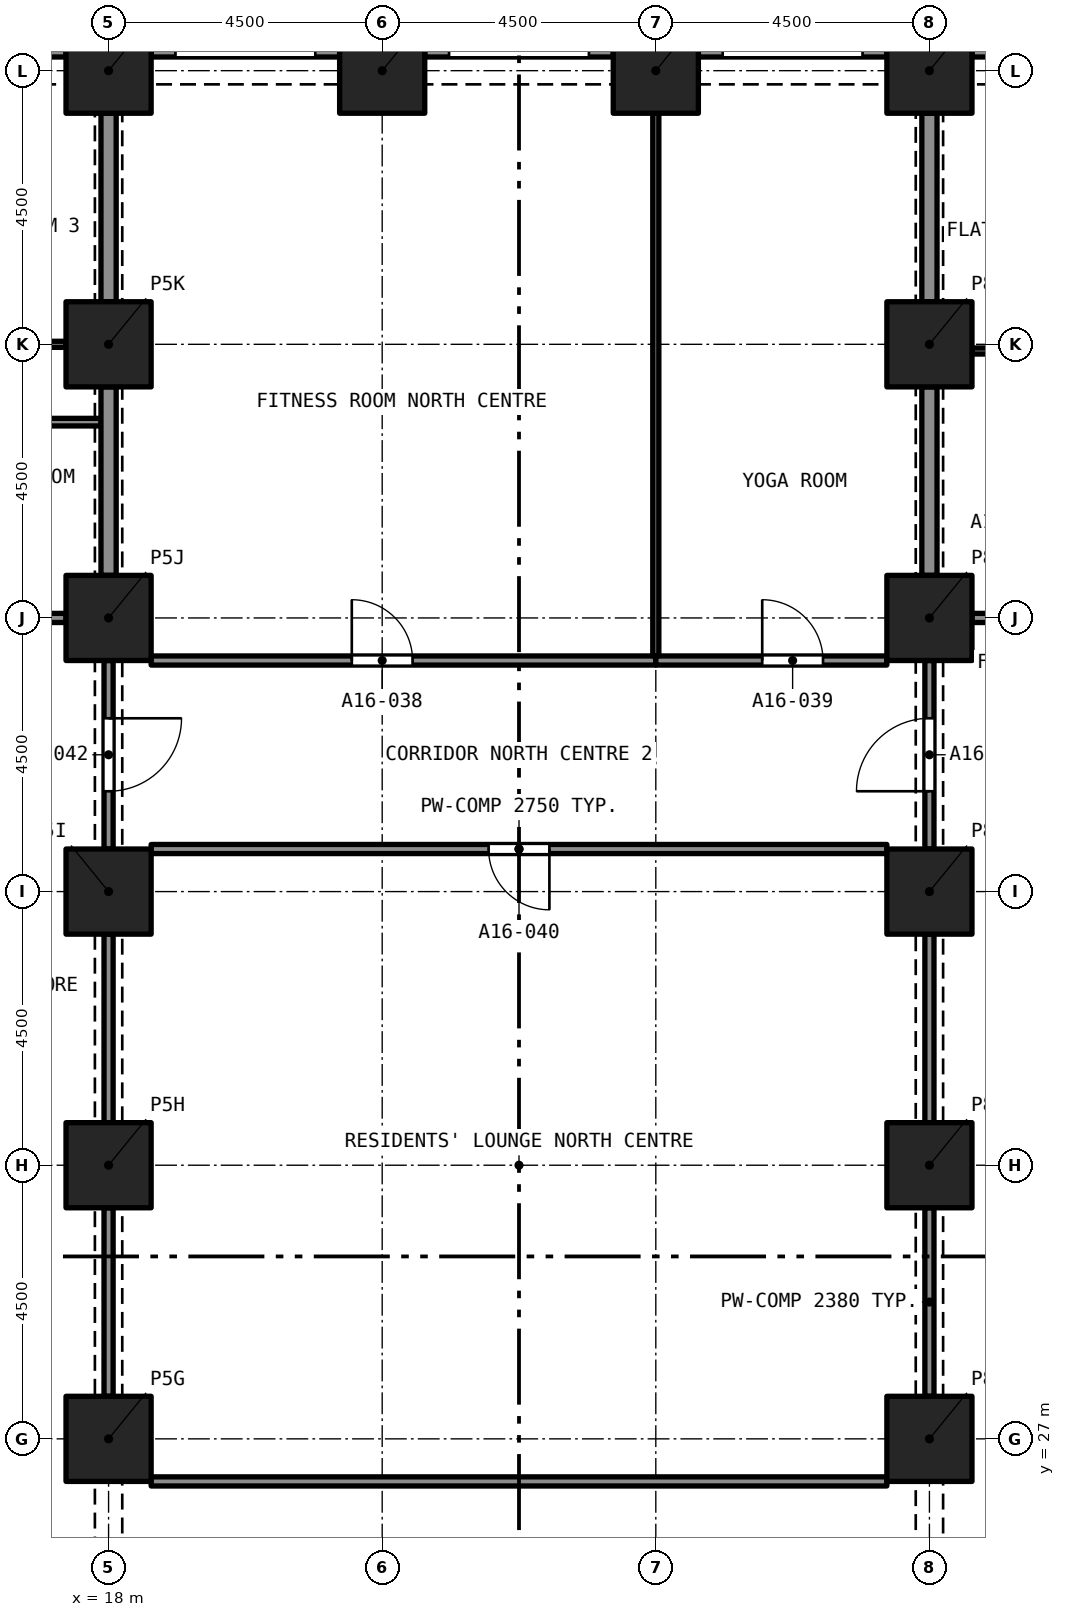
"""IFC4 building model, lengths in metres.
Left out: names, types, materials, properties, quantities, classifications, styles, units other than length and angle.
Written with IfcOpenShell. Run it as: python <this file> out.ifc"""

import sys

from ifc_helpers import new_model, si_unit, direction, frame, frame_2d, origin, origin_2d, place, context, subcontext, project, spatial, rectangle, extrude, element, fill, save


model = new_model("IFC4")
c1 = context("Model", 3, precision=1e-05, world=origin(), true_north=direction((0.0, 1.0)))
c2 = subcontext(c1, "Body", "Model", "MODEL_VIEW")
j1 = project(units=[si_unit("LENGTHUNIT", "METRE"), si_unit("PLANEANGLEUNIT", "RADIAN")], contexts=[c1])
p1 = place(None, origin())
s1 = spatial("IfcSite", under=j1, at=p1, CompositionType="ELEMENT")
p2 = place(p1, origin())
s2 = spatial("IfcBuilding", under=s1, at=p2, CompositionType="ELEMENT")
p3 = place(p2, frame((0.0, 0.0, 62.4)))
s3 = spatial("IfcBuildingStorey", under=s2, at=p3, CompositionType="ELEMENT", Elevation=62.4)
for number, where, z_axis, x_axis in (
    (1, (18.0, 27.0, 0.0), (0.0, 0.0, 1.0), (1.0, 0.0, 0.0)),
    (2, (31.5, 27.0, 0.0), (0.0, 0.0, 1.0), (1.0, 0.0, 0.0)),
    (3, (18.0, 31.5, 0.0), (0.0, 0.0, 1.0), (1.0, 0.0, 0.0)),
    (4, (31.5, 31.5, 0.0), (0.0, 0.0, 1.0), (1.0, 0.0, 0.0)),
    (5, (18.0, 36.0, 0.0), (0.0, 0.0, 1.0), (1.0, 0.0, 0.0)),
    (6, (31.5, 36.0, 0.0), (0.0, 0.0, 1.0), (1.0, 0.0, 0.0)),
    (7, (18.0, 40.5, 0.0), (0.0, 0.0, 1.0), (1.0, 0.0, 0.0)),
    (8, (31.5, 40.5, 0.0), (0.0, 0.0, 1.0), (1.0, 0.0, 0.0)),
    (9, (18.0, 45.0, 0.0), (0.0, 0.0, 1.0), (1.0, 0.0, 0.0)),
    (10, (31.5, 45.0, 0.0), (0.0, 0.0, 1.0), (1.0, 0.0, 0.0)),
    (11, (18.0, 49.5, 0.0), (0.0, 0.0, 1.0), (1.0, 0.0, 0.0)),
    (12, (22.5, 49.5, 0.0), (0.0, 0.0, 1.0), (1.0, 0.0, 0.0)),
    (13, (27.0, 49.5, 0.0), (0.0, 0.0, 1.0), (1.0, 0.0, 0.0)),
    (14, (31.5, 49.5, 0.0), (0.0, 0.0, 1.0), (1.0, 0.0, 0.0)),
):
    element("IfcColumn", number, at=place(p3, frame(where, z_axis=z_axis, x_axis=x_axis)), inside=s3, PredefinedType="COLUMN", context=c2, shape_type="SweptSolid", body=[
        extrude(rectangle(XDim=1.4, YDim=1.4, at=origin_2d()), origin(), (0.0, 0.0, 1.0), 3.2),
    ])
p4 = place(p3, frame((32.2, 49.875, 0.0), z_axis=(0.0, 0.0, 1.0), x_axis=(1.0, 0.0, 0.0)))
e15 = element("IfcWall", 15, at=p4, inside=s3, PredefinedType="SOLIDWALL", context=c2, shape_type="SweptSolid", body=[
    extrude(rectangle(XDim=3.1, YDim=0.3, at=frame_2d((1.55, 0.0))), origin(), (0.0, 0.0, 1.0), 3.2),
])
p5 = place(p4, frame((0.4, 0.0, 0.45)))
e16 = element("IfcOpeningElement", 16, at=p5, cuts=e15, PredefinedType="OPENING", context=c2, shape_type="SweptSolid", body=[
    extrude(rectangle(XDim=2.3, YDim=1.95, at=frame_2d((1.15, 0.975))), frame((0.0, 0.16, 0.0), z_axis=(0.0, -1.0, 0.0), x_axis=(1.0, 0.0, 0.0)), (0.0, 0.0, 1.0), 0.32),
])
p6 = place(p3, frame((27.7, 49.875, 0.0), z_axis=(0.0, 0.0, 1.0), x_axis=(1.0, 0.0, 0.0)))
e17 = element("IfcWall", 17, at=p6, inside=s3, PredefinedType="SOLIDWALL", context=c2, shape_type="SweptSolid", body=[
    extrude(rectangle(XDim=3.1, YDim=0.3, at=frame_2d((1.55, 0.0))), origin(), (0.0, 0.0, 1.0), 3.2),
])
p7 = place(p6, frame((0.4, 0.0, 0.45)))
e18 = element("IfcOpeningElement", 18, at=p7, cuts=e17, PredefinedType="OPENING", context=c2, shape_type="SweptSolid", body=[
    extrude(rectangle(XDim=2.3, YDim=1.95, at=frame_2d((1.15, 0.975))), frame((0.0, 0.16, 0.0), z_axis=(0.0, -1.0, 0.0), x_axis=(1.0, 0.0, 0.0)), (0.0, 0.0, 1.0), 0.32),
])
p8 = place(p3, frame((23.2, 49.875, 0.0), z_axis=(0.0, 0.0, 1.0), x_axis=(1.0, 0.0, 0.0)))
e19 = element("IfcWall", 19, at=p8, inside=s3, PredefinedType="SOLIDWALL", context=c2, shape_type="SweptSolid", body=[
    extrude(rectangle(XDim=3.1, YDim=0.3, at=frame_2d((1.55, 0.0))), origin(), (0.0, 0.0, 1.0), 3.2),
])
p9 = place(p8, frame((0.4, 0.0, 0.45)))
e20 = element("IfcOpeningElement", 20, at=p9, cuts=e19, PredefinedType="OPENING", context=c2, shape_type="SweptSolid", body=[
    extrude(rectangle(XDim=2.3, YDim=1.95, at=frame_2d((1.15, 0.975))), frame((0.0, 0.16, 0.0), z_axis=(0.0, -1.0, 0.0), x_axis=(1.0, 0.0, 0.0)), (0.0, 0.0, 1.0), 0.32),
])
p10 = place(p3, frame((18.7, 49.875, 0.0), z_axis=(0.0, 0.0, 1.0), x_axis=(1.0, 0.0, 0.0)))
e21 = element("IfcWall", 21, at=p10, inside=s3, PredefinedType="SOLIDWALL", context=c2, shape_type="SweptSolid", body=[
    extrude(rectangle(XDim=3.1, YDim=0.3, at=frame_2d((1.55, 0.0))), origin(), (0.0, 0.0, 1.0), 3.2),
])
p11 = place(p10, frame((0.4, 0.0, 0.45)))
e22 = element("IfcOpeningElement", 22, at=p11, cuts=e21, PredefinedType="OPENING", context=c2, shape_type="SweptSolid", body=[
    extrude(rectangle(XDim=2.3, YDim=1.95, at=frame_2d((1.15, 0.975))), frame((0.0, 0.16, 0.0), z_axis=(0.0, -1.0, 0.0), x_axis=(1.0, 0.0, 0.0)), (0.0, 0.0, 1.0), 0.32),
])
p12 = place(p3, frame((14.2, 49.875, 0.0), z_axis=(0.0, 0.0, 1.0), x_axis=(1.0, 0.0, 0.0)))
e23 = element("IfcWall", 23, at=p12, inside=s3, PredefinedType="SOLIDWALL", context=c2, shape_type="SweptSolid", body=[
    extrude(rectangle(XDim=3.1, YDim=0.3, at=frame_2d((1.55, 0.0))), origin(), (0.0, 0.0, 1.0), 3.2),
])
p13 = place(p12, frame((0.4, 0.0, 0.45)))
e24 = element("IfcOpeningElement", 24, at=p13, cuts=e23, PredefinedType="OPENING", context=c2, shape_type="SweptSolid", body=[
    extrude(rectangle(XDim=2.3, YDim=1.95, at=frame_2d((1.15, 0.975))), frame((0.0, 0.16, 0.0), z_axis=(0.0, -1.0, 0.0), x_axis=(1.0, 0.0, 0.0)), (0.0, 0.0, 1.0), 0.32),
])
p14 = place(p3, frame((17.875, 43.72, 0.0), z_axis=(0.0, 0.0, 1.0), x_axis=(-1.0, 0.0, 0.0)))
e25 = element("IfcWall", 25, at=p14, inside=s3, PredefinedType="PARTITIONING", context=c2, shape_type="SweptSolid", body=[
    extrude(rectangle(XDim=4.357, YDim=0.125, at=frame_2d((2.178, 0.0))), origin(), (0.0, 0.0, 1.0), 2.9),
])
p15 = place(p14, frame((1.716, 0.0, 0.0)))
e26 = element("IfcOpeningElement", 26, at=p15, cuts=e25, PredefinedType="OPENING", context=c2, shape_type="SweptSolid", body=[
    extrude(rectangle(XDim=0.8, YDim=2.1, at=frame_2d((0.4, 1.05))), frame((0.0, 0.073, 0.0), z_axis=(0.0, -1.0, 0.0), x_axis=(1.0, 0.0, 0.0)), (0.0, 0.0, 1.0), 0.145),
])
p16 = place(p3, frame((18.0, 41.2, 0.0), z_axis=(0.0, 0.0, 1.0), x_axis=(0.0, 1.0, 0.0)))
e27 = element("IfcWall", 27, at=p16, inside=s3, PredefinedType="PARTITIONING", context=c2, shape_type="SweptSolid", body=[
    extrude(rectangle(XDim=3.1, YDim=0.25, at=frame_2d((1.55, 0.0))), origin(), (0.0, 0.0, 1.0), 2.38),
])
p17 = place(p3, frame((13.456, 40.5, 0.0), z_axis=(0.0, 0.0, 1.0), x_axis=(1.0, 0.0, 0.0)))
e28 = element("IfcWall", 28, at=p17, inside=s3, PredefinedType="PARTITIONING", context=c2, shape_type="SweptSolid", body=[
    extrude(rectangle(XDim=3.844, YDim=0.15, at=frame_2d((1.922, 0.0))), origin(), (0.0, 0.0, 1.0), 2.9),
])
p18 = place(p3, frame((13.5, 45.0, 0.0), z_axis=(0.0, 0.0, 1.0), x_axis=(1.0, 0.0, 0.0)))
e29 = element("IfcWall", 29, at=p18, inside=s3, PredefinedType="PARTITIONING", context=c2, shape_type="SweptSolid", body=[
    extrude(rectangle(XDim=3.8, YDim=0.1, at=frame_2d((1.9, 0.0))), origin(), (0.0, 0.0, 1.0), 2.9),
])
p19 = place(p18, frame((1.8, 0.0, 0.0)))
e30 = element("IfcOpeningElement", 30, at=p19, cuts=e29, PredefinedType="OPENING", context=c2, shape_type="SweptSolid", body=[
    extrude(rectangle(XDim=0.9, YDim=2.1, at=frame_2d((0.45, 1.05))), frame((0.0, 0.06, 0.0), z_axis=(0.0, -1.0, 0.0), x_axis=(1.0, 0.0, 0.0)), (0.0, 0.0, 1.0), 0.12),
])
p20 = place(p3, frame((18.0, 45.7, 0.0), z_axis=(0.0, 0.0, 1.0), x_axis=(0.0, 1.0, 0.0)))
e31 = element("IfcWall", 31, at=p20, inside=s3, PredefinedType="PARTITIONING", context=c2, shape_type="SweptSolid", body=[
    extrude(rectangle(XDim=3.1, YDim=0.25, at=frame_2d((1.55, 0.0))), origin(), (0.0, 0.0, 1.0), 2.38),
])
p21 = place(p3, frame((32.2, 44.89, 0.0), z_axis=(0.0, 0.0, 1.0), x_axis=(1.0, 0.0, 0.0)))
e32 = element("IfcWall", 32, at=p21, inside=s3, PredefinedType="PARTITIONING", context=c2, shape_type="SweptSolid", body=[
    extrude(rectangle(XDim=3.8, YDim=0.1, at=frame_2d((1.9, 0.0))), origin(), (0.0, 0.0, 1.0), 2.9),
])
p22 = place(p21, frame((1.05, 0.0, 0.0)))
e33 = element("IfcOpeningElement", 33, at=p22, cuts=e32, PredefinedType="OPENING", context=c2, shape_type="SweptSolid", body=[
    extrude(rectangle(XDim=1.0, YDim=2.1, at=frame_2d((0.5, 1.05))), frame((0.0, 0.06, 0.0), z_axis=(0.0, -1.0, 0.0), x_axis=(1.0, 0.0, 0.0)), (0.0, 0.0, 1.0), 0.12),
])
p23 = place(p3, frame((31.5, 41.2, 0.0), z_axis=(0.0, 0.0, 1.0), x_axis=(0.0, 1.0, 0.0)))
e34 = element("IfcWall", 34, at=p23, inside=s3, PredefinedType="PARTITIONING", context=c2, shape_type="SweptSolid", body=[
    extrude(rectangle(XDim=3.1, YDim=0.25, at=frame_2d((1.55, 0.0))), origin(), (0.0, 0.0, 1.0), 2.38),
])
p24 = place(p3, frame((32.2, 40.5, 0.0), z_axis=(0.0, 0.0, 1.0), x_axis=(1.0, 0.0, 0.0)))
e35 = element("IfcWall", 35, at=p24, inside=s3, PredefinedType="PARTITIONING", context=c2, shape_type="SweptSolid", body=[
    extrude(rectangle(XDim=2.225, YDim=0.15, at=frame_2d((1.113, 0.0))), origin(), (0.0, 0.0, 1.0), 2.9),
])
p25 = place(p24, frame((1.05, 0.0, 0.0)))
e36 = element("IfcOpeningElement", 36, at=p25, cuts=e35, PredefinedType="OPENING", context=c2, shape_type="SweptSolid", body=[
    extrude(rectangle(XDim=1.0, YDim=2.1, at=frame_2d((0.5, 1.05))), frame((0.0, 0.085, 0.0), z_axis=(0.0, -1.0, 0.0), x_axis=(1.0, 0.0, 0.0)), (0.0, 0.0, 1.0), 0.17),
])
p26 = place(p3, frame((31.5, 45.7, 0.0), z_axis=(0.0, 0.0, 1.0), x_axis=(0.0, 1.0, 0.0)))
e37 = element("IfcWall", 37, at=p26, inside=s3, PredefinedType="PARTITIONING", context=c2, shape_type="SweptSolid", body=[
    extrude(rectangle(XDim=3.1, YDim=0.25, at=frame_2d((1.55, 0.0))), origin(), (0.0, 0.0, 1.0), 2.38),
])
p27 = place(p3, frame((18.7, 39.8, 0.0), z_axis=(0.0, 0.0, 1.0), x_axis=(1.0, 0.0, 0.0)))
e38 = element("IfcWall", 38, at=p27, inside=s3, PredefinedType="PARTITIONING", context=c2, shape_type="SweptSolid", body=[
    extrude(rectangle(XDim=8.3, YDim=0.15, at=frame_2d((4.15, 0.0))), origin(), (0.0, 0.0, 1.0), 2.75),
])
p28 = place(p27, frame((3.3, 0.0, 0.0)))
e39 = element("IfcOpeningElement", 39, at=p28, cuts=e38, PredefinedType="OPENING", context=c2, shape_type="SweptSolid", body=[
    extrude(rectangle(XDim=1.0, YDim=2.1, at=frame_2d((0.5, 1.05))), frame((0.0, 0.085, 0.0), z_axis=(0.0, -1.0, 0.0), x_axis=(1.0, 0.0, 0.0)), (0.0, 0.0, 1.0), 0.17),
])
p29 = place(p3, frame((27.0, 39.8, 0.0), z_axis=(0.0, 0.0, 1.0), x_axis=(1.0, 0.0, 0.0)))
e40 = element("IfcWall", 40, at=p29, inside=s3, PredefinedType="PARTITIONING", context=c2, shape_type="SweptSolid", body=[
    extrude(rectangle(XDim=3.8, YDim=0.15, at=frame_2d((1.9, 0.0))), origin(), (0.0, 0.0, 1.0), 2.75),
])
p30 = place(p29, frame((1.75, 0.0, 0.0)))
e41 = element("IfcOpeningElement", 41, at=p30, cuts=e40, PredefinedType="OPENING", context=c2, shape_type="SweptSolid", body=[
    extrude(rectangle(XDim=1.0, YDim=2.1, at=frame_2d((0.5, 1.05))), frame((0.0, 0.085, 0.0), z_axis=(0.0, -1.0, 0.0), x_axis=(1.0, 0.0, 0.0)), (0.0, 0.0, 1.0), 0.17),
])
p31 = place(p3, frame((30.8, 36.7, 0.0), z_axis=(0.0, 0.0, 1.0), x_axis=(-1.0, 0.0, 0.0)))
e42 = element("IfcWall", 42, at=p31, inside=s3, PredefinedType="PARTITIONING", context=c2, shape_type="SweptSolid", body=[
    extrude(rectangle(XDim=12.1, YDim=0.15, at=frame_2d((6.05, 0.0))), origin(), (0.0, 0.0, 1.0), 2.75),
])
p32 = place(p31, frame((5.55, 0.0, 0.0)))
e43 = element("IfcOpeningElement", 43, at=p32, cuts=e42, PredefinedType="OPENING", context=c2, shape_type="SweptSolid", body=[
    extrude(rectangle(XDim=1.0, YDim=2.1, at=frame_2d((0.5, 1.05))), frame((0.0, 0.085, 0.0), z_axis=(0.0, -1.0, 0.0), x_axis=(1.0, 0.0, 0.0)), (0.0, 0.0, 1.0), 0.17),
])
p33 = place(p3, frame((31.5, 36.7, 0.0), z_axis=(0.0, 0.0, 1.0), x_axis=(0.0, 1.0, 0.0)))
e44 = element("IfcWall", 44, at=p33, inside=s3, PredefinedType="PARTITIONING", context=c2, shape_type="SweptSolid", body=[
    extrude(rectangle(XDim=3.1, YDim=0.15, at=frame_2d((1.55, 0.0))), origin(), (0.0, 0.0, 1.0), 2.38),
])
p34 = place(p33, frame((0.95, 0.0, 0.0)))
e45 = element("IfcOpeningElement", 45, at=p34, cuts=e44, PredefinedType="OPENING", context=c2, shape_type="SweptSolid", body=[
    extrude(rectangle(XDim=1.2, YDim=2.1, at=frame_2d((0.6, 1.05))), frame((0.0, 0.085, 0.0), z_axis=(0.0, -1.0, 0.0), x_axis=(1.0, 0.0, 0.0)), (0.0, 0.0, 1.0), 0.17),
])
p35 = place(p3, frame((18.0, 39.8, 0.0), z_axis=(0.0, 0.0, 1.0), x_axis=(0.0, -1.0, 0.0)))
e46 = element("IfcWall", 46, at=p35, inside=s3, PredefinedType="PARTITIONING", context=c2, shape_type="SweptSolid", body=[
    extrude(rectangle(XDim=3.1, YDim=0.15, at=frame_2d((1.55, 0.0))), origin(), (0.0, 0.0, 1.0), 2.38),
])
p36 = place(p35, frame((0.95, 0.0, 0.0)))
e47 = element("IfcOpeningElement", 47, at=p36, cuts=e46, PredefinedType="OPENING", context=c2, shape_type="SweptSolid", body=[
    extrude(rectangle(XDim=1.2, YDim=2.1, at=frame_2d((0.6, 1.05))), frame((0.0, 0.085, 0.0), z_axis=(0.0, -1.0, 0.0), x_axis=(1.0, 0.0, 0.0)), (0.0, 0.0, 1.0), 0.17),
])
p37 = place(p3, frame((27.0, 39.875, 0.0), z_axis=(0.0, 0.0, 1.0), x_axis=(0.0, 1.0, 0.0)))
e48 = element("IfcWall", 48, at=p37, inside=s3, PredefinedType="PARTITIONING", context=c2, shape_type="SweptSolid", body=[
    extrude(rectangle(XDim=8.925, YDim=0.1, at=frame_2d((4.462, 0.0))), origin(), (0.0, 0.0, 1.0), 2.75),
])
for number, where, z_axis, x_axis in (
    (49, (31.5, 32.2, 0.0), (0.0, 0.0, 1.0), (0.0, 1.0, 0.0)),
    (50, (31.5, 27.7, 0.0), (0.0, 0.0, 1.0), (0.0, 1.0, 0.0)),
    (51, (18.0, 27.7, 0.0), (0.0, 0.0, 1.0), (0.0, 1.0, 0.0)),
    (52, (18.0, 32.2, 0.0), (0.0, 0.0, 1.0), (0.0, 1.0, 0.0)),
):
    element("IfcWall", number, at=place(p3, frame(where, z_axis=z_axis, x_axis=x_axis)), inside=s3, PredefinedType="PARTITIONING", context=c2, shape_type="SweptSolid", body=[
        extrude(rectangle(XDim=3.1, YDim=0.15, at=frame_2d((1.55, 0.0))), origin(), (0.0, 0.0, 1.0), 2.38),
    ])
p38 = place(p3, frame((18.7, 26.3, 0.0), z_axis=(0.0, 0.0, 1.0), x_axis=(1.0, 0.0, 0.0)))
e53 = element("IfcWall", 53, at=p38, inside=s3, PredefinedType="PARTITIONING", context=c2, shape_type="SweptSolid", body=[
    extrude(rectangle(XDim=12.1, YDim=0.15, at=frame_2d((6.05, 0.0))), origin(), (0.0, 0.0, 1.0), 2.75),
])
p39 = place(p28, origin())
e54 = element("IfcDoor", 54, at=p39, inside=s3, OperationType="SINGLE_SWING_LEFT", PredefinedType="DOOR", context=c2, shape_type="SweptSolid", body=[
    extrude(rectangle(XDim=1.0, YDim=2.1, at=frame_2d((0.5, 1.05))), frame((0.0, 0.025, 0.0), z_axis=(0.0, -1.0, 0.0), x_axis=(1.0, 0.0, 0.0)), (0.0, 0.0, 1.0), 0.05),
])
fill(e39, e54)
p40 = place(p30, origin())
e55 = element("IfcDoor", 55, at=p40, inside=s3, OperationType="SINGLE_SWING_RIGHT", PredefinedType="DOOR", context=c2, shape_type="SweptSolid", body=[
    extrude(rectangle(XDim=1.0, YDim=2.1, at=frame_2d((0.5, 1.05))), frame((0.0, 0.025, 0.0), z_axis=(0.0, -1.0, 0.0), x_axis=(1.0, 0.0, 0.0)), (0.0, 0.0, 1.0), 0.05),
])
fill(e41, e55)
p41 = place(p32, origin())
e56 = element("IfcDoor", 56, at=p41, inside=s3, OperationType="SINGLE_SWING_RIGHT", PredefinedType="DOOR", context=c2, shape_type="SweptSolid", body=[
    extrude(rectangle(XDim=1.0, YDim=2.1, at=frame_2d((0.5, 1.05))), frame((0.0, 0.025, 0.0), z_axis=(0.0, -1.0, 0.0), x_axis=(1.0, 0.0, 0.0)), (0.0, 0.0, 1.0), 0.05),
])
fill(e43, e56)
p42 = place(p34, origin())
e57 = element("IfcDoor", 57, at=p42, inside=s3, OperationType="SINGLE_SWING_LEFT", PredefinedType="DOOR", context=c2, shape_type="SweptSolid", body=[
    extrude(rectangle(XDim=1.2, YDim=2.1, at=frame_2d((0.6, 1.05))), frame((0.0, 0.025, 0.0), z_axis=(0.0, -1.0, 0.0), x_axis=(1.0, 0.0, 0.0)), (0.0, 0.0, 1.0), 0.05),
])
fill(e45, e57)
p43 = place(p36, origin())
e58 = element("IfcDoor", 58, at=p43, inside=s3, OperationType="SINGLE_SWING_LEFT", PredefinedType="DOOR", context=c2, shape_type="SweptSolid", body=[
    extrude(rectangle(XDim=1.2, YDim=2.1, at=frame_2d((0.6, 1.05))), frame((0.0, 0.025, 0.0), z_axis=(0.0, -1.0, 0.0), x_axis=(1.0, 0.0, 0.0)), (0.0, 0.0, 1.0), 0.05),
])
fill(e47, e58)
save(model, sys.argv[1])
